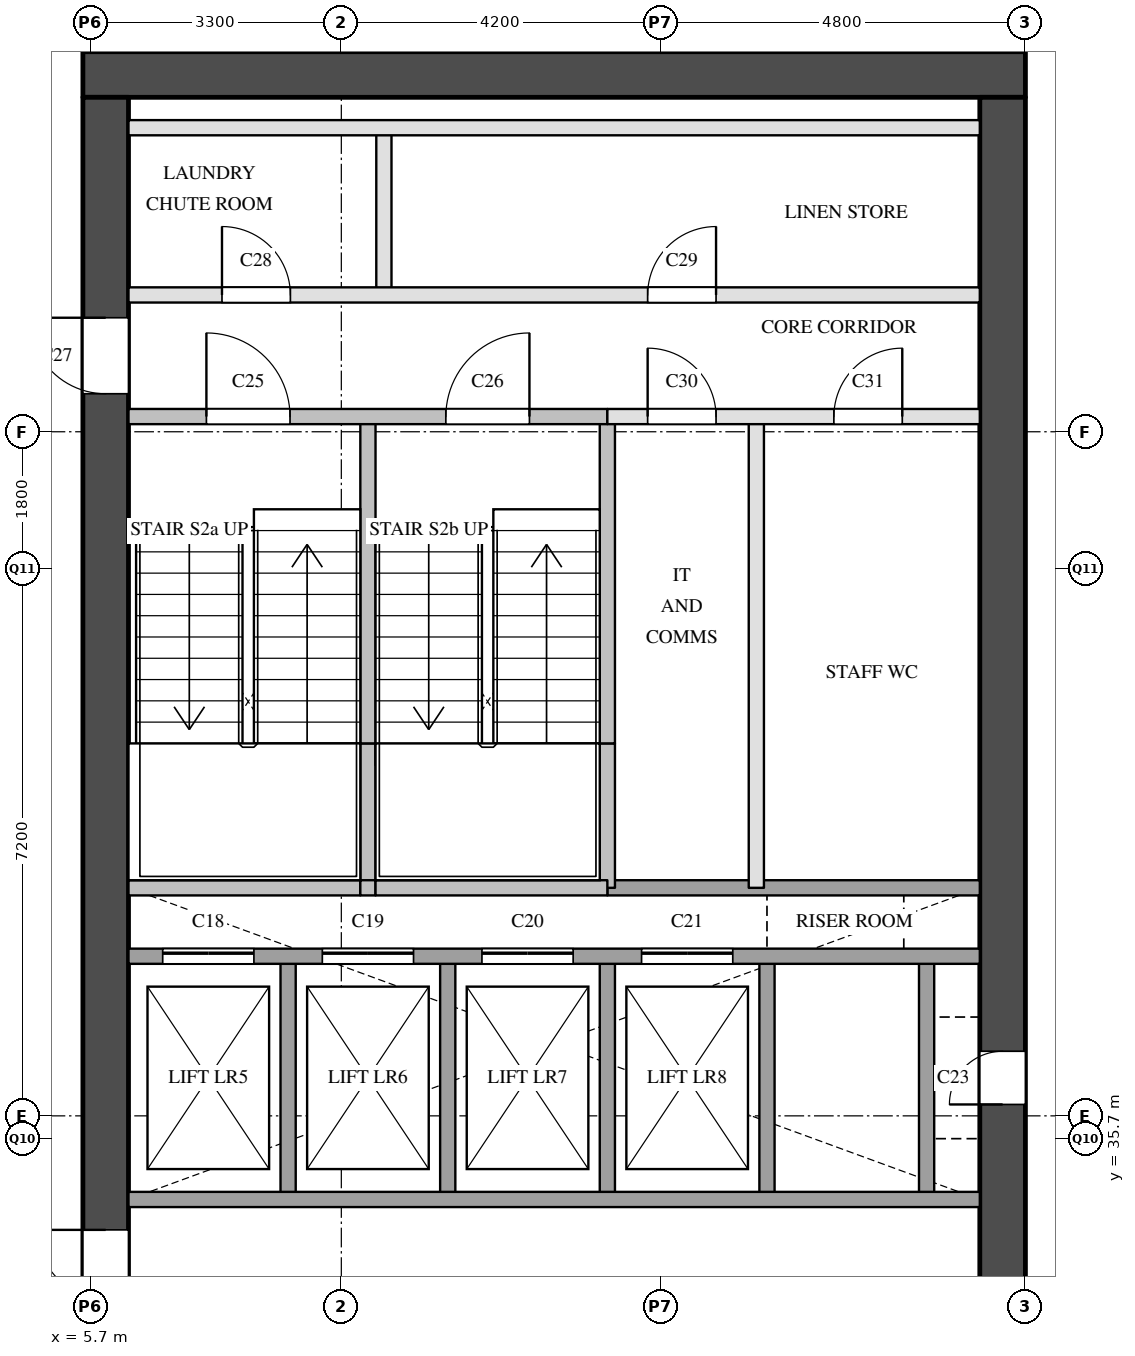
"""IFC4 building model, lengths in metres.
Left out: names, types, materials, properties, quantities, classifications, styles, units other than length and angle.
Written with IfcOpenShell. Run it as: python <this file> out.ifc"""

import sys

from ifc_helpers import new_model, si_unit, direction, frame, frame_2d, origin, place, context, subcontext, project, spatial, rectangle, extrude, element, fill, save


model = new_model("IFC4")
c1 = context("Model", 3, precision=1e-05, world=origin(), true_north=direction((0.0, 1.0)))
c2 = subcontext(c1, "Body", "Model", "MODEL_VIEW")
j1 = project(units=[si_unit("LENGTHUNIT", "METRE"), si_unit("PLANEANGLEUNIT", "RADIAN")], contexts=[c1])
p1 = place(None, origin())
s1 = spatial("IfcSite", under=j1, at=p1, CompositionType="ELEMENT")
p2 = place(p1, origin())
s2 = spatial("IfcBuilding", under=s1, at=p2, CompositionType="ELEMENT")
p3 = place(p2, frame((0.0, 0.0, 69.0)))
s3 = spatial("IfcBuildingStorey", under=s2, at=p3, CompositionType="ELEMENT", Elevation=69.0)
p4 = place(p3, frame((5.6, 49.7, 0.0), z_axis=(0.0, 0.0, 1.0), x_axis=(1.0, 0.0, 0.0)))
e1 = element("IfcWall", 1, at=p4, inside=s3, PredefinedType="SHEAR", context=c2, shape_type="SweptSolid", body=[
    extrude(rectangle(XDim=12.4, YDim=0.6, at=frame_2d((6.2, 0.0))), origin(), (0.0, 0.0, 1.0), 3.5),
])
p5 = place(p3, frame((5.9, 29.1, 0.0), z_axis=(0.0, 0.0, 1.0), x_axis=(0.0, 1.0, 0.0)))
e2 = element("IfcWall", 2, at=p5, inside=s3, PredefinedType="SHEAR", context=c2, shape_type="SweptSolid", body=[
    extrude(rectangle(XDim=20.3, YDim=0.6, at=frame_2d((10.15, 0.0))), origin(), (0.0, 0.0, 1.0), 3.5),
])
p6 = place(p5, frame((3.6, 0.0, 0.0)))
e3 = element("IfcOpeningElement", 3, at=p6, cuts=e2, PredefinedType="OPENING", context=c2, shape_type="SweptSolid", body=[
    extrude(rectangle(XDim=1.8, YDim=2.1, at=frame_2d((0.9, 1.05))), frame((0.0, 0.31, 0.0), z_axis=(0.0, -1.0, 0.0), x_axis=(1.0, 0.0, 0.0)), (0.0, 0.0, 1.0), 0.62),
])
p7 = place(p5, frame((16.4, 0.0, 0.0)))
e4 = element("IfcOpeningElement", 4, at=p7, cuts=e2, PredefinedType="OPENING", context=c2, shape_type="SweptSolid", body=[
    extrude(rectangle(XDim=1.0, YDim=2.1, at=frame_2d((0.5, 1.05))), frame((0.0, 0.31, 0.0), z_axis=(0.0, -1.0, 0.0), x_axis=(1.0, 0.0, 0.0)), (0.0, 0.0, 1.0), 0.62),
])
p8 = place(p3, frame((17.7, 29.1, 0.0), z_axis=(0.0, 0.0, 1.0), x_axis=(0.0, 1.0, 0.0)))
e5 = element("IfcWall", 5, at=p8, inside=s3, PredefinedType="SHEAR", context=c2, shape_type="SweptSolid", body=[
    extrude(rectangle(XDim=20.3, YDim=0.6, at=frame_2d((10.15, 0.0))), origin(), (0.0, 0.0, 1.0), 3.5),
])
p9 = place(p8, frame((1.25, 0.0, 0.0)))
e6 = element("IfcOpeningElement", 6, at=p9, cuts=e5, PredefinedType="OPENING", context=c2, shape_type="SweptSolid", body=[
    extrude(rectangle(XDim=0.7, YDim=2.1, at=frame_2d((0.35, 1.05))), frame((0.0, 0.31, 0.0), z_axis=(0.0, -1.0, 0.0), x_axis=(1.0, 0.0, 0.0)), (0.0, 0.0, 1.0), 0.62),
])
p10 = place(p8, frame((7.05, 0.0, 0.0)))
e7 = element("IfcOpeningElement", 7, at=p10, cuts=e5, PredefinedType="OPENING", context=c2, shape_type="SweptSolid", body=[
    extrude(rectangle(XDim=0.7, YDim=2.1, at=frame_2d((0.35, 1.05))), frame((0.0, 0.31, 0.0), z_axis=(0.0, -1.0, 0.0), x_axis=(1.0, 0.0, 0.0)), (0.0, 0.0, 1.0), 0.62),
])
p11 = place(p3, frame((8.3, 34.9, 0.0), z_axis=(0.0, 0.0, 1.0), x_axis=(0.0, 1.0, 0.0)))
e8 = element("IfcWall", 8, at=p11, inside=s3, PredefinedType="SOLIDWALL", context=c2, shape_type="SweptSolid", body=[
    extrude(rectangle(XDim=3.2, YDim=0.2, at=frame_2d((1.6, 0.0))), origin(), (0.0, 0.0, 1.0), 3.5),
])
p12 = place(p3, frame((9.35, 39.0, 0.0), z_axis=(0.0, 0.0, 1.0), x_axis=(0.0, 1.0, 0.0)))
e9 = element("IfcWall", 9, at=p12, inside=s3, PredefinedType="SOLIDWALL", context=c2, shape_type="SweptSolid", body=[
    extrude(rectangle(XDim=1.9, YDim=0.2, at=frame_2d((0.95, 0.0))), origin(), (0.0, 0.0, 1.0), 3.5),
])
p13 = place(p3, frame((9.35, 40.9, 0.0), z_axis=(0.0, 0.0, 1.0), x_axis=(0.0, 1.0, 0.0)))
e10 = element("IfcWall", 10, at=p13, inside=s3, PredefinedType="SOLIDWALL", context=c2, shape_type="SweptSolid", body=[
    extrude(rectangle(XDim=4.3, YDim=0.2, at=frame_2d((2.15, 0.0))), origin(), (0.0, 0.0, 1.0), 3.5),
])
p14 = place(p3, frame((9.56, 46.8, 0.0), z_axis=(0.0, 0.0, 1.0), x_axis=(0.0, 1.0, 0.0)))
e11 = element("IfcWall", 11, at=p14, inside=s3, PredefinedType="PARTITIONING", context=c2, shape_type="SweptSolid", body=[
    extrude(rectangle(XDim=2.2, YDim=0.2, at=frame_2d((1.1, 0.0))), origin(), (0.0, 0.0, 1.0), 3.5),
])
for number, where, z_axis, x_axis in (
    (12, (10.4, 34.9, 0.0), (0.0, 0.0, 1.0), (0.0, 1.0, 0.0)),
    (13, (12.5, 34.9, 0.0), (0.0, 0.0, 1.0), (0.0, 1.0, 0.0)),
):
    element("IfcWall", number, at=place(p3, frame(where, z_axis=z_axis, x_axis=x_axis)), inside=s3, PredefinedType="SOLIDWALL", context=c2, shape_type="SweptSolid", body=[
        extrude(rectangle(XDim=3.2, YDim=0.2, at=frame_2d((1.6, 0.0))), origin(), (0.0, 0.0, 1.0), 3.5),
    ])
p15 = place(p3, frame((12.5, 39.0, 0.0), z_axis=(0.0, 0.0, 1.0), x_axis=(0.0, 1.0, 0.0)))
e14 = element("IfcWall", 14, at=p15, inside=s3, PredefinedType="SOLIDWALL", context=c2, shape_type="SweptSolid", body=[
    extrude(rectangle(XDim=1.9, YDim=0.2, at=frame_2d((0.95, 0.0))), origin(), (0.0, 0.0, 1.0), 3.5),
])
p16 = place(p3, frame((12.5, 40.9, 0.0), z_axis=(0.0, 0.0, 1.0), x_axis=(0.0, 1.0, 0.0)))
e15 = element("IfcWall", 15, at=p16, inside=s3, PredefinedType="SOLIDWALL", context=c2, shape_type="SweptSolid", body=[
    extrude(rectangle(XDim=4.3, YDim=0.2, at=frame_2d((2.15, 0.0))), origin(), (0.0, 0.0, 1.0), 3.5),
])
p17 = place(p3, frame((14.46, 39.0, 0.0), z_axis=(0.0, 0.0, 1.0), x_axis=(0.0, 1.0, 0.0)))
e16 = element("IfcWall", 16, at=p17, inside=s3, PredefinedType="PARTITIONING", context=c2, shape_type="SweptSolid", body=[
    extrude(rectangle(XDim=6.2, YDim=0.2, at=frame_2d((3.1, 0.0))), origin(), (0.0, 0.0, 1.0), 3.5),
])
for number, where, z_axis, x_axis in (
    (17, (14.6, 34.9, 0.0), (0.0, 0.0, 1.0), (0.0, 1.0, 0.0)),
    (18, (16.7, 34.9, 0.0), (0.0, 0.0, 1.0), (0.0, 1.0, 0.0)),
):
    element("IfcWall", number, at=place(p3, frame(where, z_axis=z_axis, x_axis=x_axis)), inside=s3, PredefinedType="SOLIDWALL", context=c2, shape_type="SweptSolid", body=[
        extrude(rectangle(XDim=3.2, YDim=0.2, at=frame_2d((1.6, 0.0))), origin(), (0.0, 0.0, 1.0), 3.5),
    ])
p18 = place(p3, frame((6.2, 34.9, 0.0), z_axis=(0.0, 0.0, 1.0), x_axis=(1.0, 0.0, 0.0)))
e19 = element("IfcWall", 19, at=p18, inside=s3, PredefinedType="SOLIDWALL", context=c2, shape_type="SweptSolid", body=[
    extrude(rectangle(XDim=11.2, YDim=0.2, at=frame_2d((5.6, 0.0))), origin(), (0.0, 0.0, 1.0), 3.5),
])
p19 = place(p3, frame((6.2, 38.1, 0.0), z_axis=(0.0, 0.0, 1.0), x_axis=(1.0, 0.0, 0.0)))
e20 = element("IfcWall", 20, at=p19, inside=s3, PredefinedType="SOLIDWALL", context=c2, shape_type="SweptSolid", body=[
    extrude(rectangle(XDim=11.2, YDim=0.2, at=frame_2d((5.6, 0.0))), origin(), (0.0, 0.0, 1.0), 3.5),
])
p20 = place(p19, frame((0.45, 0.0, 0.0)))
e21 = element("IfcOpeningElement", 21, at=p20, cuts=e20, PredefinedType="OPENING", context=c2, shape_type="SweptSolid", body=[
    extrude(rectangle(XDim=1.2, YDim=2.1, at=frame_2d((0.6, 1.05))), frame((0.0, 0.11, 0.0), z_axis=(0.0, -1.0, 0.0), x_axis=(1.0, 0.0, 0.0)), (0.0, 0.0, 1.0), 0.22),
])
p21 = place(p19, frame((2.55, 0.0, 0.0)))
e22 = element("IfcOpeningElement", 22, at=p21, cuts=e20, PredefinedType="OPENING", context=c2, shape_type="SweptSolid", body=[
    extrude(rectangle(XDim=1.2, YDim=2.1, at=frame_2d((0.6, 1.05))), frame((0.0, 0.11, 0.0), z_axis=(0.0, -1.0, 0.0), x_axis=(1.0, 0.0, 0.0)), (0.0, 0.0, 1.0), 0.22),
])
p22 = place(p19, frame((4.65, 0.0, 0.0)))
e23 = element("IfcOpeningElement", 23, at=p22, cuts=e20, PredefinedType="OPENING", context=c2, shape_type="SweptSolid", body=[
    extrude(rectangle(XDim=1.2, YDim=2.1, at=frame_2d((0.6, 1.05))), frame((0.0, 0.11, 0.0), z_axis=(0.0, -1.0, 0.0), x_axis=(1.0, 0.0, 0.0)), (0.0, 0.0, 1.0), 0.22),
])
p23 = place(p19, frame((6.75, 0.0, 0.0)))
e24 = element("IfcOpeningElement", 24, at=p23, cuts=e20, PredefinedType="OPENING", context=c2, shape_type="SweptSolid", body=[
    extrude(rectangle(XDim=1.2, YDim=2.1, at=frame_2d((0.6, 1.05))), frame((0.0, 0.11, 0.0), z_axis=(0.0, -1.0, 0.0), x_axis=(1.0, 0.0, 0.0)), (0.0, 0.0, 1.0), 0.22),
])
p24 = place(p3, frame((12.5, 39.0, 0.0), z_axis=(0.0, 0.0, 1.0), x_axis=(1.0, 0.0, 0.0)))
e25 = element("IfcWall", 25, at=p24, inside=s3, PredefinedType="SOLIDWALL", context=c2, shape_type="SweptSolid", body=[
    extrude(rectangle(XDim=4.9, YDim=0.2, at=frame_2d((2.45, 0.0))), origin(), (0.0, 0.0, 1.0), 3.5),
])
p25 = place(p3, frame((6.2, 39.0, 0.0), z_axis=(0.0, 0.0, 1.0), x_axis=(1.0, 0.0, 0.0)))
e26 = element("IfcWall", 26, at=p25, inside=s3, PredefinedType="SOLIDWALL", context=c2, shape_type="SweptSolid", body=[
    extrude(rectangle(XDim=3.05, YDim=0.2, at=frame_2d((1.525, 0.0))), origin(), (0.0, 0.0, 1.0), 3.5),
])
p26 = place(p3, frame((9.25, 39.0, 0.0), z_axis=(0.0, 0.0, 1.0), x_axis=(1.0, 0.0, 0.0)))
e27 = element("IfcWall", 27, at=p26, inside=s3, PredefinedType="SOLIDWALL", context=c2, shape_type="SweptSolid", body=[
    extrude(rectangle(XDim=0.2, YDim=0.2, at=frame_2d((0.1, 0.0))), origin(), (0.0, 0.0, 1.0), 3.5),
])
p27 = place(p3, frame((9.45, 39.0, 0.0), z_axis=(0.0, 0.0, 1.0), x_axis=(1.0, 0.0, 0.0)))
e28 = element("IfcWall", 28, at=p27, inside=s3, PredefinedType="SOLIDWALL", context=c2, shape_type="SweptSolid", body=[
    extrude(rectangle(XDim=3.05, YDim=0.2, at=frame_2d((1.525, 0.0))), origin(), (0.0, 0.0, 1.0), 3.5),
])
p28 = place(p3, frame((12.5, 45.2, 0.0), z_axis=(0.0, 0.0, 1.0), x_axis=(1.0, 0.0, 0.0)))
e29 = element("IfcWall", 29, at=p28, inside=s3, PredefinedType="PARTITIONING", context=c2, shape_type="SweptSolid", body=[
    extrude(rectangle(XDim=4.9, YDim=0.2, at=frame_2d((2.45, 0.0))), origin(), (0.0, 0.0, 1.0), 3.5),
])
p29 = place(p28, frame((0.53, 0.0, 0.0)))
e30 = element("IfcOpeningElement", 30, at=p29, cuts=e29, PredefinedType="OPENING", context=c2, shape_type="SweptSolid", body=[
    extrude(rectangle(XDim=0.9, YDim=2.1, at=frame_2d((0.45, 1.05))), frame((0.0, 0.11, 0.0), z_axis=(0.0, -1.0, 0.0), x_axis=(1.0, 0.0, 0.0)), (0.0, 0.0, 1.0), 0.22),
])
p30 = place(p28, frame((2.98, 0.0, 0.0)))
e31 = element("IfcOpeningElement", 31, at=p30, cuts=e29, PredefinedType="OPENING", context=c2, shape_type="SweptSolid", body=[
    extrude(rectangle(XDim=0.9, YDim=2.1, at=frame_2d((0.45, 1.05))), frame((0.0, 0.11, 0.0), z_axis=(0.0, -1.0, 0.0), x_axis=(1.0, 0.0, 0.0)), (0.0, 0.0, 1.0), 0.22),
])
p31 = place(p3, frame((6.2, 45.2, 0.0), z_axis=(0.0, 0.0, 1.0), x_axis=(1.0, 0.0, 0.0)))
e32 = element("IfcWall", 32, at=p31, inside=s3, PredefinedType="SOLIDWALL", context=c2, shape_type="SweptSolid", body=[
    extrude(rectangle(XDim=6.3, YDim=0.2, at=frame_2d((3.15, 0.0))), origin(), (0.0, 0.0, 1.0), 3.5),
])
p32 = place(p31, frame((1.025, 0.0, 0.0)))
e33 = element("IfcOpeningElement", 33, at=p32, cuts=e32, PredefinedType="OPENING", context=c2, shape_type="SweptSolid", body=[
    extrude(rectangle(XDim=1.1, YDim=2.1, at=frame_2d((0.55, 1.05))), frame((0.0, 0.11, 0.0), z_axis=(0.0, -1.0, 0.0), x_axis=(1.0, 0.0, 0.0)), (0.0, 0.0, 1.0), 0.22),
])
p33 = place(p31, frame((4.175, 0.0, 0.0)))
e34 = element("IfcOpeningElement", 34, at=p33, cuts=e32, PredefinedType="OPENING", context=c2, shape_type="SweptSolid", body=[
    extrude(rectangle(XDim=1.1, YDim=2.1, at=frame_2d((0.55, 1.05))), frame((0.0, 0.11, 0.0), z_axis=(0.0, -1.0, 0.0), x_axis=(1.0, 0.0, 0.0)), (0.0, 0.0, 1.0), 0.22),
])
p34 = place(p3, frame((6.2, 46.8, 0.0), z_axis=(0.0, 0.0, 1.0), x_axis=(1.0, 0.0, 0.0)))
e35 = element("IfcWall", 35, at=p34, inside=s3, PredefinedType="PARTITIONING", context=c2, shape_type="SweptSolid", body=[
    extrude(rectangle(XDim=11.2, YDim=0.2, at=frame_2d((5.6, 0.0))), origin(), (0.0, 0.0, 1.0), 3.5),
])
p35 = place(p34, frame((1.23, 0.0, 0.0)))
e36 = element("IfcOpeningElement", 36, at=p35, cuts=e35, PredefinedType="OPENING", context=c2, shape_type="SweptSolid", body=[
    extrude(rectangle(XDim=0.9, YDim=2.1, at=frame_2d((0.45, 1.05))), frame((0.0, 0.11, 0.0), z_axis=(0.0, -1.0, 0.0), x_axis=(1.0, 0.0, 0.0)), (0.0, 0.0, 1.0), 0.22),
])
p36 = place(p34, frame((6.83, 0.0, 0.0)))
e37 = element("IfcOpeningElement", 37, at=p36, cuts=e35, PredefinedType="OPENING", context=c2, shape_type="SweptSolid", body=[
    extrude(rectangle(XDim=0.9, YDim=2.1, at=frame_2d((0.45, 1.05))), frame((0.0, 0.11, 0.0), z_axis=(0.0, -1.0, 0.0), x_axis=(1.0, 0.0, 0.0)), (0.0, 0.0, 1.0), 0.22),
])
p37 = place(p3, frame((6.2, 49.0, 0.0), z_axis=(0.0, 0.0, 1.0), x_axis=(1.0, 0.0, 0.0)))
e38 = element("IfcWall", 38, at=p37, inside=s3, PredefinedType="PARTITIONING", context=c2, shape_type="SweptSolid", body=[
    extrude(rectangle(XDim=11.2, YDim=0.2, at=frame_2d((5.6, 0.0))), origin(), (0.0, 0.0, 1.0), 3.5),
])
p38 = place(p20, origin())
e39 = element("IfcDoor", 39, at=p38, inside=s3, OperationType="SLIDING_TO_LEFT", PredefinedType="DOOR", context=c2, shape_type="SweptSolid", body=[
    extrude(rectangle(XDim=1.2, YDim=2.1, at=frame_2d((0.6, 1.05))), frame((0.0, 0.025, 0.0), z_axis=(0.0, -1.0, 0.0), x_axis=(1.0, 0.0, 0.0)), (0.0, 0.0, 1.0), 0.05),
])
fill(e21, e39)
p39 = place(p21, origin())
e40 = element("IfcDoor", 40, at=p39, inside=s3, OperationType="SLIDING_TO_LEFT", PredefinedType="DOOR", context=c2, shape_type="SweptSolid", body=[
    extrude(rectangle(XDim=1.2, YDim=2.1, at=frame_2d((0.6, 1.05))), frame((0.0, 0.025, 0.0), z_axis=(0.0, -1.0, 0.0), x_axis=(1.0, 0.0, 0.0)), (0.0, 0.0, 1.0), 0.05),
])
fill(e22, e40)
p40 = place(p22, origin())
e41 = element("IfcDoor", 41, at=p40, inside=s3, OperationType="SLIDING_TO_LEFT", PredefinedType="DOOR", context=c2, shape_type="SweptSolid", body=[
    extrude(rectangle(XDim=1.2, YDim=2.1, at=frame_2d((0.6, 1.05))), frame((0.0, 0.025, 0.0), z_axis=(0.0, -1.0, 0.0), x_axis=(1.0, 0.0, 0.0)), (0.0, 0.0, 1.0), 0.05),
])
fill(e23, e41)
p41 = place(p23, origin())
e42 = element("IfcDoor", 42, at=p41, inside=s3, OperationType="SLIDING_TO_LEFT", PredefinedType="DOOR", context=c2, shape_type="SweptSolid", body=[
    extrude(rectangle(XDim=1.2, YDim=2.1, at=frame_2d((0.6, 1.05))), frame((0.0, 0.025, 0.0), z_axis=(0.0, -1.0, 0.0), x_axis=(1.0, 0.0, 0.0)), (0.0, 0.0, 1.0), 0.05),
])
fill(e24, e42)
p42 = place(p10, origin())
e43 = element("IfcDoor", 43, at=p42, inside=s3, OperationType="SINGLE_SWING_LEFT", PredefinedType="DOOR", context=c2, shape_type="SweptSolid", body=[
    extrude(rectangle(XDim=0.7, YDim=2.1, at=frame_2d((0.35, 1.05))), frame((0.0, 0.025, 0.0), z_axis=(0.0, -1.0, 0.0), x_axis=(1.0, 0.0, 0.0)), (0.0, 0.0, 1.0), 0.05),
])
fill(e7, e43)
p43 = place(p6, origin())
e44 = element("IfcDoor", 44, at=p43, inside=s3, OperationType="DOUBLE_DOOR_SINGLE_SWING", PredefinedType="DOOR", context=c2, shape_type="SweptSolid", body=[
    extrude(rectangle(XDim=1.8, YDim=2.1, at=frame_2d((0.9, 1.05))), frame((0.0, 0.025, 0.0), z_axis=(0.0, -1.0, 0.0), x_axis=(1.0, 0.0, 0.0)), (0.0, 0.0, 1.0), 0.05),
])
fill(e3, e44)
p44 = place(p32, origin())
e45 = element("IfcDoor", 45, at=p44, inside=s3, OperationType="SINGLE_SWING_LEFT", PredefinedType="DOOR", context=c2, shape_type="SweptSolid", body=[
    extrude(rectangle(XDim=1.1, YDim=2.1, at=frame_2d((0.55, 1.05))), frame((0.0, 0.025, 0.0), z_axis=(0.0, -1.0, 0.0), x_axis=(1.0, 0.0, 0.0)), (0.0, 0.0, 1.0), 0.05),
])
fill(e33, e45)
p45 = place(p33, origin())
e46 = element("IfcDoor", 46, at=p45, inside=s3, OperationType="SINGLE_SWING_RIGHT", PredefinedType="DOOR", context=c2, shape_type="SweptSolid", body=[
    extrude(rectangle(XDim=1.1, YDim=2.1, at=frame_2d((0.55, 1.05))), frame((0.0, 0.025, 0.0), z_axis=(0.0, -1.0, 0.0), x_axis=(1.0, 0.0, 0.0)), (0.0, 0.0, 1.0), 0.05),
])
fill(e34, e46)
p46 = place(p7, origin())
e47 = element("IfcDoor", 47, at=p46, inside=s3, OperationType="SINGLE_SWING_RIGHT", PredefinedType="DOOR", context=c2, shape_type="SweptSolid", body=[
    extrude(rectangle(XDim=1.0, YDim=2.1, at=frame_2d((0.5, 1.05))), frame((0.0, 0.025, 0.0), z_axis=(0.0, -1.0, 0.0), x_axis=(1.0, 0.0, 0.0)), (0.0, 0.0, 1.0), 0.05),
])
fill(e4, e47)
p47 = place(p35, origin())
e48 = element("IfcDoor", 48, at=p47, inside=s3, OperationType="SINGLE_SWING_LEFT", PredefinedType="DOOR", context=c2, shape_type="SweptSolid", body=[
    extrude(rectangle(XDim=0.9, YDim=2.1, at=frame_2d((0.45, 1.05))), frame((0.0, 0.025, 0.0), z_axis=(0.0, -1.0, 0.0), x_axis=(1.0, 0.0, 0.0)), (0.0, 0.0, 1.0), 0.05),
])
fill(e36, e48)
p48 = place(p36, origin())
e49 = element("IfcDoor", 49, at=p48, inside=s3, OperationType="SINGLE_SWING_RIGHT", PredefinedType="DOOR", context=c2, shape_type="SweptSolid", body=[
    extrude(rectangle(XDim=0.9, YDim=2.1, at=frame_2d((0.45, 1.05))), frame((0.0, 0.025, 0.0), z_axis=(0.0, -1.0, 0.0), x_axis=(1.0, 0.0, 0.0)), (0.0, 0.0, 1.0), 0.05),
])
fill(e37, e49)
p49 = place(p29, origin())
e50 = element("IfcDoor", 50, at=p49, inside=s3, OperationType="SINGLE_SWING_LEFT", PredefinedType="DOOR", context=c2, shape_type="SweptSolid", body=[
    extrude(rectangle(XDim=0.9, YDim=2.1, at=frame_2d((0.45, 1.05))), frame((0.0, 0.025, 0.0), z_axis=(0.0, -1.0, 0.0), x_axis=(1.0, 0.0, 0.0)), (0.0, 0.0, 1.0), 0.05),
])
fill(e30, e50)
p50 = place(p30, origin())
e51 = element("IfcDoor", 51, at=p50, inside=s3, OperationType="SINGLE_SWING_RIGHT", PredefinedType="DOOR", context=c2, shape_type="SweptSolid", body=[
    extrude(rectangle(XDim=0.9, YDim=2.1, at=frame_2d((0.45, 1.05))), frame((0.0, 0.025, 0.0), z_axis=(0.0, -1.0, 0.0), x_axis=(1.0, 0.0, 0.0)), (0.0, 0.0, 1.0), 0.05),
])
fill(e31, e51)
save(model, sys.argv[1])
